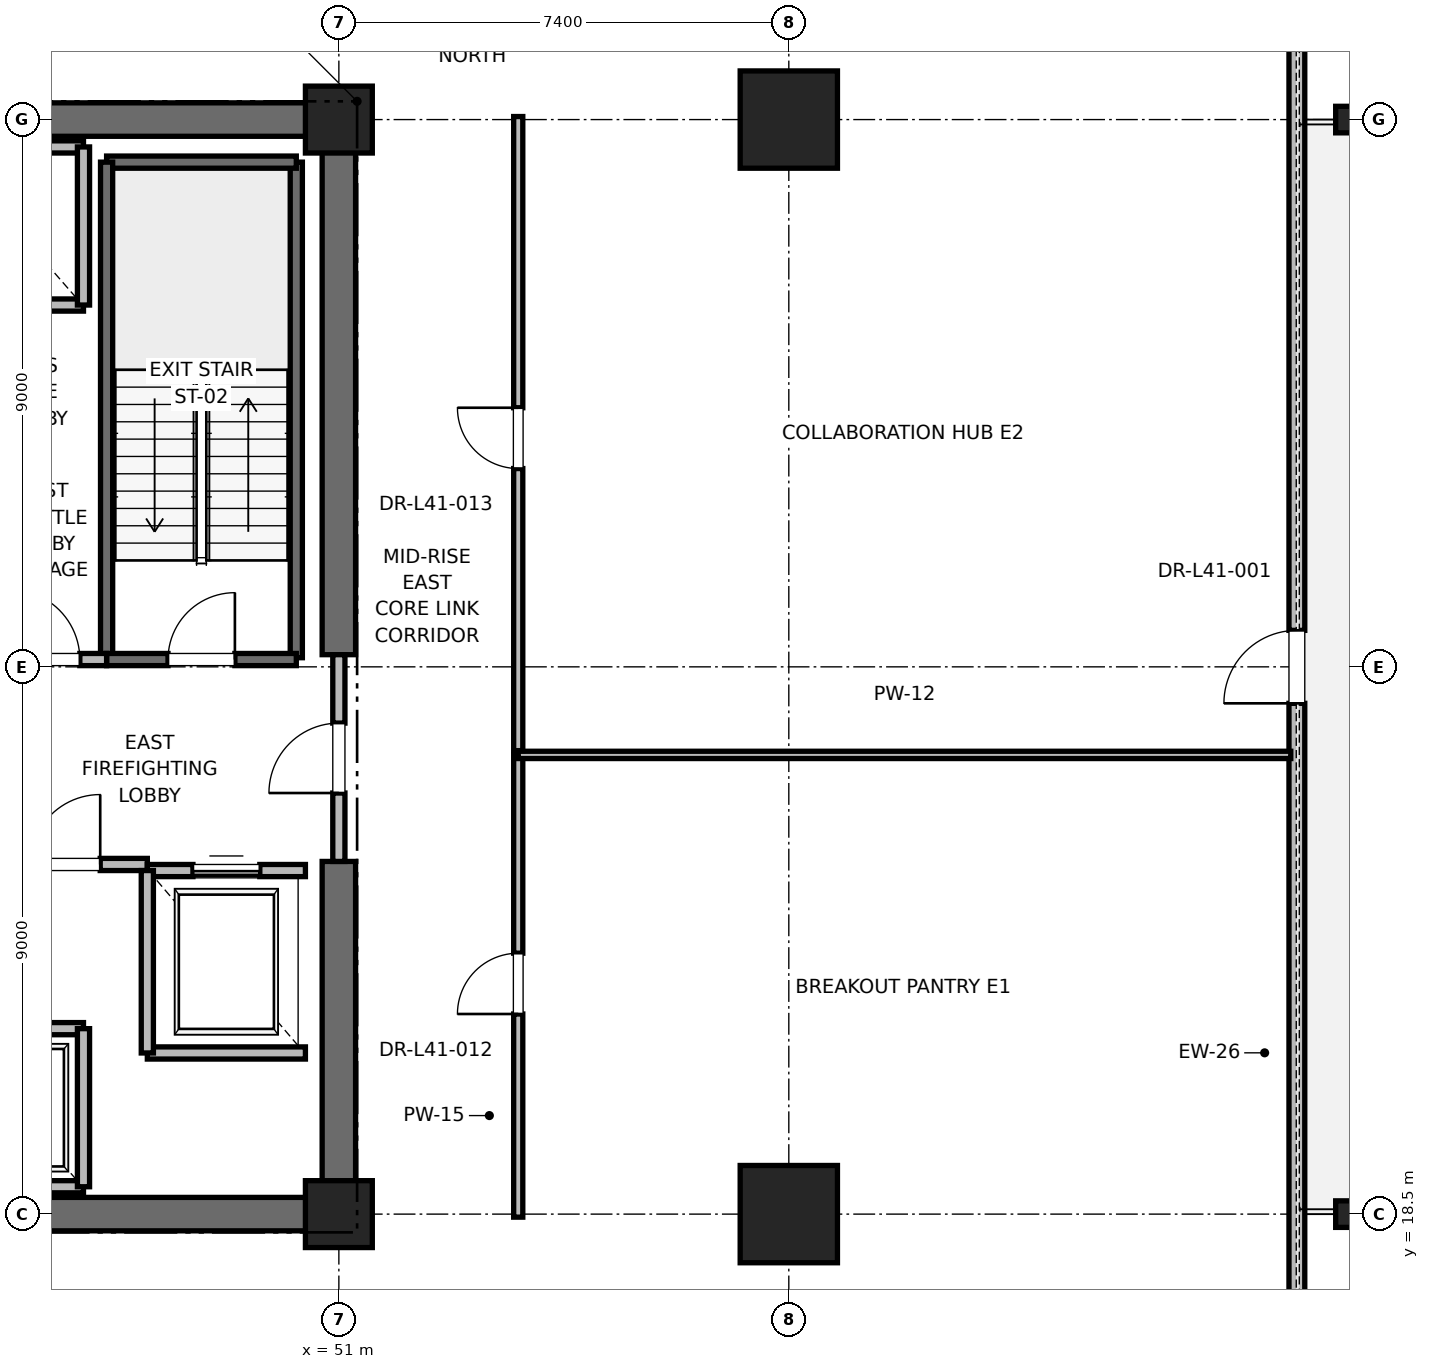
"""IFC4 building model, lengths in metres.
Left out: names, types, materials, properties, quantities, classifications, styles, units other than length and angle.
Written with IfcOpenShell. Run it as: python <this file> out.ifc"""

import sys

from ifc_helpers import new_model, si_unit, direction, frame, frame_2d, origin, origin_2d, place, context, subcontext, project, spatial, rectangle, i_section, extrude, element, fill, save


model = new_model("IFC4")
c1 = context("Model", 3, precision=1e-05, world=origin(), true_north=direction((0.0, 1.0)))
c2 = subcontext(c1, "Body", "Model", "MODEL_VIEW")
j1 = project(units=[si_unit("LENGTHUNIT", "METRE"), si_unit("PLANEANGLEUNIT", "RADIAN")], contexts=[c1])
p1 = place(None, origin())
s1 = spatial("IfcSite", under=j1, at=p1, CompositionType="ELEMENT")
p2 = place(p1, origin())
s2 = spatial("IfcBuilding", under=s1, at=p2, CompositionType="ELEMENT")
p3 = place(p2, frame((0.0, 0.0, 176.4)))
s3 = spatial("IfcBuildingStorey", under=s2, at=p3, CompositionType="ELEMENT", Elevation=176.4)
for number, where, z_axis, x_axis in (
    (1, (58.4, 18.5, 0.0), (0.0, 0.0, 1.0), (1.0, 0.0, 0.0)),
    (2, (58.4, 36.5, 0.0), (0.0, 0.0, 1.0), (1.0, 0.0, 0.0)),
):
    element("IfcColumn", number, at=place(p3, frame(where, z_axis=z_axis, x_axis=x_axis)), inside=s3, PredefinedType="COLUMN", context=c2, shape_type="SweptSolid", body=[
        extrude(rectangle(XDim=1.6, YDim=1.6, at=origin_2d()), origin(), (0.0, 0.0, 1.0), 4.0),
    ])
for number, where, z_axis, x_axis in (
    (3, (67.6, 18.5, 0.0), (0.0, 0.0, 1.0), (1.0, 0.0, 0.0)),
    (4, (67.6, 36.5, 0.0), (0.0, 0.0, 1.0), (1.0, 0.0, 0.0)),
):
    element("IfcColumn", number, at=place(p3, frame(where, z_axis=z_axis, x_axis=x_axis)), inside=s3, PredefinedType="COLUMN", context=c2, shape_type="SweptSolid", body=[
        extrude(i_section(OverallWidth=0.412, OverallDepth=0.437, WebThickness=0.036, FlangeThickness=0.058, FilletRadius=0.015, at=origin_2d()), origin(), (0.0, 0.0, 1.0), 4.0),
    ])
for number, where, z_axis, x_axis in (
    (5, (51.0, 18.5, 0.0), (0.0, 0.0, 1.0), (1.0, 0.0, 0.0)),
    (6, (51.0, 36.5, 0.0), (0.0, 0.0, 1.0), (1.0, 0.0, 0.0)),
):
    element("IfcColumn", number, at=place(p3, frame(where, z_axis=z_axis, x_axis=x_axis)), inside=s3, PredefinedType="PILASTER", context=c2, shape_type="SweptSolid", body=[
        extrude(rectangle(XDim=1.1, YDim=1.1, at=origin_2d()), origin(), (0.0, 0.0, 1.0), 4.0),
    ])
p4 = place(p3, frame((41.8, 18.5, 0.0), z_axis=(0.0, 0.0, 1.0), x_axis=(1.0, 0.0, 0.0)))
e7 = element("IfcWall", 7, at=p4, inside=s3, PredefinedType="SHEAR", context=c2, shape_type="SweptSolid", body=[
    extrude(rectangle(XDim=9.2, YDim=0.55, at=frame_2d((4.6, 0.0))), origin(), (0.0, 0.0, 1.0), 3.775),
])
for number, where, z_axis, x_axis in (
    (8, (45.2, 36.5, 0.0), (0.0, 0.0, 1.0), (1.0, 0.0, 0.0)),
    (9, (51.0, 18.5, 0.0), (0.0, 0.0, 1.0), (0.0, 1.0, 0.0)),
):
    element("IfcWall", number, at=place(p3, frame(where, z_axis=z_axis, x_axis=x_axis)), inside=s3, PredefinedType="SHEAR", context=c2, shape_type="SweptSolid", body=[
        extrude(rectangle(XDim=5.8, YDim=0.55, at=frame_2d((2.9, 0.0))), origin(), (0.0, 0.0, 1.0), 3.775),
    ])
p5 = place(p3, frame((51.0, 27.7, 0.0), z_axis=(0.0, 0.0, 1.0), x_axis=(0.0, 1.0, 0.0)))
e10 = element("IfcWall", 10, at=p5, inside=s3, PredefinedType="SHEAR", context=c2, shape_type="SweptSolid", body=[
    extrude(rectangle(XDim=8.8, YDim=0.55, at=frame_2d((4.4, 0.0))), origin(), (0.0, 0.0, 1.0), 3.775),
])
p6 = place(p3, frame((66.756, 9.205, 0.0), z_axis=(0.0, 0.0, 1.0), x_axis=(0.0, 1.0, 0.0)))
e11 = element("IfcWall", 11, at=p6, inside=s3, PredefinedType="PARAPET", context=c2, shape_type="SweptSolid", body=[
    extrude(rectangle(XDim=36.59, YDim=0.26, at=frame_2d((18.295, 0.0))), origin(), (0.0, 0.0, 1.0), 2.97),
])
p7 = place(p6, frame((4.2, 0.0, 0.85)))
e12 = element("IfcOpeningElement", 12, at=p7, cuts=e11, PredefinedType="OPENING", context=c2, shape_type="SweptSolid", body=[
    extrude(rectangle(XDim=2.0, YDim=2.3, at=frame_2d((1.0, 1.15))), frame((0.0, 0.13, 0.0), z_axis=(0.0, -1.0, 0.0), x_axis=(1.0, 0.0, 0.0)), (0.0, 0.0, 1.0), 0.26),
])
p8 = place(p6, frame((17.695, 0.0, 0.0)))
e13 = element("IfcOpeningElement", 13, at=p8, cuts=e11, PredefinedType="OPENING", context=c2, shape_type="SweptSolid", body=[
    extrude(rectangle(XDim=1.2, YDim=2.2, at=frame_2d((0.6, 1.1))), frame((0.0, 0.13, 0.0), z_axis=(0.0, -1.0, 0.0), x_axis=(1.0, 0.0, 0.0)), (0.0, 0.0, 1.0), 0.26),
])
p9 = place(p6, frame((30.39, 0.0, 0.85)))
e14 = element("IfcOpeningElement", 14, at=p9, cuts=e11, PredefinedType="OPENING", context=c2, shape_type="SweptSolid", body=[
    extrude(rectangle(XDim=2.0, YDim=2.3, at=frame_2d((1.0, 1.15))), frame((0.0, 0.13, 0.0), z_axis=(0.0, -1.0, 0.0), x_axis=(1.0, 0.0, 0.0)), (0.0, 0.0, 1.0), 0.26),
])
p10 = place(p3, frame((50.3, 27.65, 0.0), z_axis=(0.0, 0.0, 1.0), x_axis=(0.0, 1.0, 0.0)))
e15 = element("IfcWall", 15, at=p10, inside=s3, PredefinedType="SOLIDWALL", context=c2, shape_type="SweptSolid", body=[
    extrude(rectangle(XDim=8.15, YDim=0.2, at=frame_2d((4.075, 0.0))), origin(), (0.0, 0.0, 1.0), 3.775),
])
p11 = place(p3, frame((47.18, 35.8, 0.0), z_axis=(0.0, 0.0, 1.0), x_axis=(1.0, 0.0, 0.0)))
e16 = element("IfcWall", 16, at=p11, inside=s3, PredefinedType="SOLIDWALL", context=c2, shape_type="SweptSolid", body=[
    extrude(rectangle(XDim=3.12, YDim=0.2, at=frame_2d((1.56, 0.0))), origin(), (0.0, 0.0, 1.0), 3.775),
])
p12 = place(p3, frame((47.18, 27.62, 0.0), z_axis=(0.0, 0.0, 1.0), x_axis=(0.0, 1.0, 0.0)))
e17 = element("IfcWall", 17, at=p12, inside=s3, PredefinedType="SOLIDWALL", context=c2, shape_type="SweptSolid", body=[
    extrude(rectangle(XDim=8.18, YDim=0.2, at=frame_2d((4.09, 0.0))), origin(), (0.0, 0.0, 1.0), 3.775),
])
p13 = place(p3, frame((47.18, 27.62, 0.0), z_axis=(0.0, 0.0, 1.0), x_axis=(1.0, 0.0, 0.0)))
e18 = element("IfcWall", 18, at=p13, inside=s3, PredefinedType="SOLIDWALL", context=c2, shape_type="SweptSolid", body=[
    extrude(rectangle(XDim=3.12, YDim=0.2, at=frame_2d((1.56, 0.0))), origin(), (0.0, 0.0, 1.0), 3.775),
])
p14 = place(p13, frame((1.01, 0.0, 0.0)))
e19 = element("IfcOpeningElement", 19, at=p14, cuts=e18, PredefinedType="OPENING", context=c2, shape_type="SweptSolid", body=[
    extrude(rectangle(XDim=1.1, YDim=2.15, at=frame_2d((0.55, 1.075))), frame((0.0, 0.1, 0.0), z_axis=(0.0, -1.0, 0.0), x_axis=(1.0, 0.0, 0.0)), (0.0, 0.0, 1.0), 0.2),
])
p15 = place(p3, frame((45.15, 24.25, 0.0), z_axis=(0.0, 0.0, 1.0), x_axis=(1.0, 0.0, 0.0)))
e20 = element("IfcWall", 20, at=p15, inside=s3, PredefinedType="PARTITIONING", context=c2, shape_type="SweptSolid", body=[
    extrude(rectangle(XDim=2.7, YDim=0.2, at=frame_2d((1.35, 0.0))), origin(), (0.0, 0.0, 1.0), 3.775),
])
p16 = place(p15, frame((0.775, 0.0, 0.0)))
e21 = element("IfcOpeningElement", 21, at=p16, cuts=e20, PredefinedType="OPENING", context=c2, shape_type="SweptSolid", body=[
    extrude(rectangle(XDim=1.15, YDim=2.2, at=frame_2d((0.575, 1.1))), frame((0.0, 0.1, 0.0), z_axis=(0.0, -1.0, 0.0), x_axis=(1.0, 0.0, 0.0)), (0.0, 0.0, 1.0), 0.2),
])
p17 = place(p3, frame((45.15, 27.62, 0.0), z_axis=(0.0, 0.0, 1.0), x_axis=(1.0, 0.0, 0.0)))
e22 = element("IfcWall", 22, at=p17, inside=s3, PredefinedType="PARTITIONING", context=c2, shape_type="SweptSolid", body=[
    extrude(rectangle(XDim=2.03, YDim=0.2, at=frame_2d((1.015, 0.0))), origin(), (0.0, 0.0, 1.0), 3.775),
])
p18 = place(p17, frame((0.44, 0.0, 0.0)))
e23 = element("IfcOpeningElement", 23, at=p18, cuts=e22, PredefinedType="OPENING", context=c2, shape_type="SweptSolid", body=[
    extrude(rectangle(XDim=1.15, YDim=2.2, at=frame_2d((0.575, 1.1))), frame((0.0, 0.1, 0.0), z_axis=(0.0, -1.0, 0.0), x_axis=(1.0, 0.0, 0.0)), (0.0, 0.0, 1.0), 0.2),
])
p19 = place(p3, frame((51.0, 24.3, 0.0), z_axis=(0.0, 0.0, 1.0), x_axis=(0.0, 1.0, 0.0)))
e24 = element("IfcWall", 24, at=p19, inside=s3, PredefinedType="PARTITIONING", context=c2, shape_type="SweptSolid", body=[
    extrude(rectangle(XDim=3.4, YDim=0.2, at=frame_2d((1.7, 0.0))), origin(), (0.0, 0.0, 1.0), 2.755),
])
p20 = place(p19, frame((1.125, 0.0, 0.0)))
e25 = element("IfcOpeningElement", 25, at=p20, cuts=e24, PredefinedType="OPENING", context=c2, shape_type="SweptSolid", body=[
    extrude(rectangle(XDim=1.15, YDim=2.2, at=frame_2d((0.575, 1.1))), frame((0.0, 0.1, 0.0), z_axis=(0.0, -1.0, 0.0), x_axis=(1.0, 0.0, 0.0)), (0.0, 0.0, 1.0), 0.2),
])
p21 = place(p3, frame((47.85, 21.15, 0.0), z_axis=(0.0, 0.0, 1.0), x_axis=(1.0, 0.0, 0.0)))
e26 = element("IfcWall", 26, at=p21, inside=s3, PredefinedType="SOLIDWALL", context=c2, shape_type="SweptSolid", body=[
    extrude(rectangle(XDim=2.6, YDim=0.2, at=frame_2d((1.3, 0.0))), origin(), (0.0, 0.0, 1.0), 3.775),
])
p22 = place(p3, frame((50.45, 24.15, 0.0), z_axis=(0.0, 0.0, 1.0), x_axis=(-1.0, 0.0, 0.0)))
e27 = element("IfcWall", 27, at=p22, inside=s3, PredefinedType="SOLIDWALL", context=c2, shape_type="SweptSolid", body=[
    extrude(rectangle(XDim=2.6, YDim=0.2, at=frame_2d((1.3, 0.0))), origin(), (0.0, 0.0, 1.0), 2.755),
])
p23 = place(p22, frame((0.75, 0.0, 0.0)))
e28 = element("IfcOpeningElement", 28, at=p23, cuts=e27, PredefinedType="OPENING", context=c2, shape_type="SweptSolid", body=[
    extrude(rectangle(XDim=1.1, YDim=2.2, at=frame_2d((0.55, 1.1))), frame((0.0, 0.1, 0.0), z_axis=(0.0, -1.0, 0.0), x_axis=(1.0, 0.0, 0.0)), (0.0, 0.0, 1.0), 0.2),
])
p24 = place(p3, frame((47.85, 24.15, 0.0), z_axis=(0.0, 0.0, 1.0), x_axis=(0.0, -1.0, 0.0)))
e29 = element("IfcWall", 29, at=p24, inside=s3, PredefinedType="SOLIDWALL", context=c2, shape_type="SweptSolid", body=[
    extrude(rectangle(XDim=3.0, YDim=0.2, at=frame_2d((1.5, 0.0))), origin(), (0.0, 0.0, 1.0), 3.775),
])
p25 = place(p3, frame((44.5, 18.95, 0.0), z_axis=(0.0, 0.0, 1.0), x_axis=(1.0, 0.0, 0.0)))
e30 = element("IfcWall", 30, at=p25, inside=s3, PredefinedType="SOLIDWALL", context=c2, shape_type="SweptSolid", body=[
    extrude(rectangle(XDim=2.3, YDim=0.2, at=frame_2d((1.15, 0.0))), origin(), (0.0, 0.0, 1.0), 3.775),
])
p26 = place(p3, frame((46.8, 21.55, 0.0), z_axis=(0.0, 0.0, 1.0), x_axis=(-1.0, 0.0, 0.0)))
e31 = element("IfcWall", 31, at=p26, inside=s3, PredefinedType="SOLIDWALL", context=c2, shape_type="SweptSolid", body=[
    extrude(rectangle(XDim=2.3, YDim=0.2, at=frame_2d((1.15, 0.0))), origin(), (0.0, 0.0, 1.0), 3.775),
])
p27 = place(p26, frame((0.6, 0.0, 0.0)))
e32 = element("IfcOpeningElement", 32, at=p27, cuts=e31, PredefinedType="OPENING", context=c2, shape_type="SweptSolid", body=[
    extrude(rectangle(XDim=1.1, YDim=2.2, at=frame_2d((0.55, 1.1))), frame((0.0, 0.1, 0.0), z_axis=(0.0, -1.0, 0.0), x_axis=(1.0, 0.0, 0.0)), (0.0, 0.0, 1.0), 0.2),
])
p28 = place(p3, frame((46.8, 18.95, 0.0), z_axis=(0.0, 0.0, 1.0), x_axis=(0.0, 1.0, 0.0)))
e33 = element("IfcWall", 33, at=p28, inside=s3, PredefinedType="SOLIDWALL", context=c2, shape_type="SweptSolid", body=[
    extrude(rectangle(XDim=2.6, YDim=0.2, at=frame_2d((1.3, 0.0))), origin(), (0.0, 0.0, 1.0), 3.775),
])
p29 = place(p3, frame((44.5, 33.45, 0.0), z_axis=(0.0, 0.0, 1.0), x_axis=(1.0, 0.0, 0.0)))
e34 = element("IfcWall", 34, at=p29, inside=s3, PredefinedType="SOLIDWALL", context=c2, shape_type="SweptSolid", body=[
    extrude(rectangle(XDim=2.3, YDim=0.2, at=frame_2d((1.15, 0.0))), origin(), (0.0, 0.0, 1.0), 3.775),
])
p30 = place(p3, frame((46.8, 36.05, 0.0), z_axis=(0.0, 0.0, 1.0), x_axis=(-1.0, 0.0, 0.0)))
e35 = element("IfcWall", 35, at=p30, inside=s3, PredefinedType="SOLIDWALL", context=c2, shape_type="SweptSolid", body=[
    extrude(rectangle(XDim=2.3, YDim=0.2, at=frame_2d((1.15, 0.0))), origin(), (0.0, 0.0, 1.0), 2.755),
])
p31 = place(p3, frame((46.8, 33.45, 0.0), z_axis=(0.0, 0.0, 1.0), x_axis=(0.0, 1.0, 0.0)))
e36 = element("IfcWall", 36, at=p31, inside=s3, PredefinedType="SOLIDWALL", context=c2, shape_type="SweptSolid", body=[
    extrude(rectangle(XDim=2.6, YDim=0.2, at=frame_2d((1.3, 0.0))), origin(), (0.0, 0.0, 1.0), 3.775),
])
p32 = place(p3, frame((53.95, 18.45, 0.0), z_axis=(0.0, 0.0, 1.0), x_axis=(0.0, 1.0, 0.0)))
e37 = element("IfcWall", 37, at=p32, inside=s3, PredefinedType="PARTITIONING", context=c2, shape_type="SweptSolid", body=[
    extrude(rectangle(XDim=7.602, YDim=0.15, at=frame_2d((3.801, 0.0))), origin(), (0.0, 0.0, 1.0), 2.85),
])
p33 = place(p32, frame((3.341, 0.0, 0.0)))
e38 = element("IfcOpeningElement", 38, at=p33, cuts=e37, PredefinedType="OPENING", context=c2, shape_type="SweptSolid", body=[
    extrude(rectangle(XDim=1.0, YDim=2.15, at=frame_2d((0.5, 1.075))), frame((0.0, 0.075, 0.0), z_axis=(0.0, -1.0, 0.0), x_axis=(1.0, 0.0, 0.0)), (0.0, 0.0, 1.0), 0.15),
])
p34 = place(p3, frame((53.95, 26.052, 0.0), z_axis=(0.0, 0.0, 1.0), x_axis=(1.0, 0.0, 0.0)))
e39 = element("IfcWall", 39, at=p34, inside=s3, PredefinedType="PARTITIONING", context=c2, shape_type="SweptSolid", body=[
    extrude(rectangle(XDim=12.706, YDim=0.12, at=frame_2d((6.353, 0.0))), origin(), (0.0, 0.0, 1.0), 2.85),
])
p35 = place(p3, frame((53.95, 26.122, 0.0), z_axis=(0.0, 0.0, 1.0), x_axis=(0.0, 1.0, 0.0)))
e40 = element("IfcWall", 40, at=p35, inside=s3, PredefinedType="PARTITIONING", context=c2, shape_type="SweptSolid", body=[
    extrude(rectangle(XDim=10.428, YDim=0.15, at=frame_2d((5.214, 0.0))), origin(), (0.0, 0.0, 1.0), 2.85),
])
p36 = place(p35, frame((4.639, 0.0, 0.0)))
e41 = element("IfcOpeningElement", 41, at=p36, cuts=e40, PredefinedType="OPENING", context=c2, shape_type="SweptSolid", body=[
    extrude(rectangle(XDim=1.0, YDim=2.15, at=frame_2d((0.5, 1.075))), frame((0.0, 0.075, 0.0), z_axis=(0.0, -1.0, 0.0), x_axis=(1.0, 0.0, 0.0)), (0.0, 0.0, 1.0), 0.15),
])
p37 = place(p8, origin())
e42 = element("IfcDoor", 42, at=p37, inside=s3, OperationType="SINGLE_SWING_LEFT", PredefinedType="DOOR", context=c2, shape_type="SweptSolid", body=[
    extrude(rectangle(XDim=1.2, YDim=2.2, at=frame_2d((0.6, 1.1))), frame((0.0, 0.025, 0.0), z_axis=(0.0, -1.0, 0.0), x_axis=(1.0, 0.0, 0.0)), (0.0, 0.0, 1.0), 0.05),
])
fill(e13, e42)
p38 = place(p14, origin())
e43 = element("IfcDoor", 43, at=p38, inside=s3, OperationType="SINGLE_SWING_RIGHT", PredefinedType="DOOR", context=c2, shape_type="SweptSolid", body=[
    extrude(rectangle(XDim=1.1, YDim=2.15, at=frame_2d((0.55, 1.075))), frame((0.0, 0.025, 0.0), z_axis=(0.0, -1.0, 0.0), x_axis=(1.0, 0.0, 0.0)), (0.0, 0.0, 1.0), 0.05),
])
fill(e19, e43)
p39 = place(p16, origin())
e44 = element("IfcDoor", 44, at=p39, inside=s3, OperationType="SINGLE_SWING_RIGHT", PredefinedType="DOOR", context=c2, shape_type="SweptSolid", body=[
    extrude(rectangle(XDim=1.15, YDim=2.2, at=frame_2d((0.575, 1.1))), frame((0.0, 0.025, 0.0), z_axis=(0.0, -1.0, 0.0), x_axis=(1.0, 0.0, 0.0)), (0.0, 0.0, 1.0), 0.05),
])
fill(e21, e44)
p40 = place(p18, origin())
e45 = element("IfcDoor", 45, at=p40, inside=s3, OperationType="SINGLE_SWING_LEFT", PredefinedType="DOOR", context=c2, shape_type="SweptSolid", body=[
    extrude(rectangle(XDim=1.15, YDim=2.2, at=frame_2d((0.575, 1.1))), frame((0.0, 0.025, 0.0), z_axis=(0.0, -1.0, 0.0), x_axis=(1.0, 0.0, 0.0)), (0.0, 0.0, 1.0), 0.05),
])
fill(e23, e45)
p41 = place(p20, origin())
e46 = element("IfcDoor", 46, at=p41, inside=s3, OperationType="SINGLE_SWING_LEFT", PredefinedType="DOOR", context=c2, shape_type="SweptSolid", body=[
    extrude(rectangle(XDim=1.15, YDim=2.2, at=frame_2d((0.575, 1.1))), frame((0.0, 0.025, 0.0), z_axis=(0.0, -1.0, 0.0), x_axis=(1.0, 0.0, 0.0)), (0.0, 0.0, 1.0), 0.05),
])
fill(e25, e46)
p42 = place(p23, origin())
e47 = element("IfcDoor", 47, at=p42, inside=s3, OperationType="SLIDING_TO_RIGHT", PredefinedType="DOOR", context=c2, shape_type="SweptSolid", body=[
    extrude(rectangle(XDim=1.1, YDim=2.2, at=frame_2d((0.55, 1.1))), frame((0.0, 0.025, 0.0), z_axis=(0.0, -1.0, 0.0), x_axis=(1.0, 0.0, 0.0)), (0.0, 0.0, 1.0), 0.05),
])
fill(e28, e47)
p43 = place(p33, origin())
e48 = element("IfcDoor", 48, at=p43, inside=s3, OperationType="SINGLE_SWING_LEFT", PredefinedType="DOOR", context=c2, shape_type="SweptSolid", body=[
    extrude(rectangle(XDim=1.0, YDim=2.15, at=frame_2d((0.5, 1.075))), frame((0.0, 0.025, 0.0), z_axis=(0.0, -1.0, 0.0), x_axis=(1.0, 0.0, 0.0)), (0.0, 0.0, 1.0), 0.05),
])
fill(e38, e48)
p44 = place(p36, origin())
e49 = element("IfcDoor", 49, at=p44, inside=s3, OperationType="SINGLE_SWING_RIGHT", PredefinedType="DOOR", context=c2, shape_type="SweptSolid", body=[
    extrude(rectangle(XDim=1.0, YDim=2.15, at=frame_2d((0.5, 1.075))), frame((0.0, 0.025, 0.0), z_axis=(0.0, -1.0, 0.0), x_axis=(1.0, 0.0, 0.0)), (0.0, 0.0, 1.0), 0.05),
])
fill(e41, e49)
save(model, sys.argv[1])
